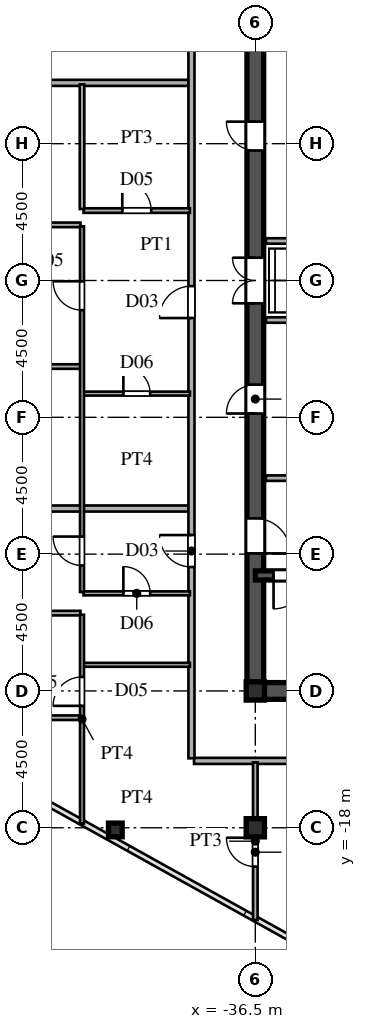
"""IFC4 building model, lengths in metres.
Left out: names, types, materials, properties, quantities, classifications, styles, units other than length and angle.
Written with IfcOpenShell. Run it as: python <this file> out.ifc"""

import sys

from ifc_helpers import new_model, si_unit, direction, frame, frame_2d, origin, origin_2d, place, context, subcontext, project, spatial, rectangle, hollow_rectangle, i_section, extrude, source, transform, mapped, element, fill, save


model = new_model("IFC4")
c1 = context("Model", 3, precision=1e-05, world=origin(), true_north=direction((0.0, 1.0)))
c2 = subcontext(c1, "Body", "Model", "MODEL_VIEW")
j1 = project(units=[si_unit("LENGTHUNIT", "METRE"), si_unit("PLANEANGLEUNIT", "RADIAN")], contexts=[c1])
p1 = place(None, origin())
s1 = spatial("IfcSite", under=j1, at=p1, CompositionType="ELEMENT")
p2 = place(p1, origin())
s2 = spatial("IfcBuilding", under=s1, at=p2, CompositionType="ELEMENT")
p3 = place(p2, frame((0.0, 0.0, 158.4)))
s3 = spatial("IfcBuildingStorey", under=s2, at=p3, CompositionType="ELEMENT", Elevation=158.4)
m1 = source(origin(), c2, "Body", "SweptSolid", [
    extrude(i_section(OverallWidth=0.6, OverallDepth=0.6, WebThickness=0.025, FlangeThickness=0.04, at=origin_2d()), origin(), (0.0, 0.0, 1.0), 3.6),
])
for number, where, z_axis, x_axis in (
    (1, (-36.5, -18.0, 0.0), (0.0, 0.0, 1.0), (1.0, 0.0, 0.0)),
    (2, (-36.5, -13.5, 0.0), (0.0, 0.0, 1.0), (1.0, 0.0, 0.0)),
):
    element("IfcColumn", number, at=place(p3, frame(where, z_axis=z_axis, x_axis=x_axis)), inside=s3, PredefinedType="COLUMN", context=c2, shape_type="MappedRepresentation", body=[
        mapped(m1, transform((0.0, 0.0, 0.0), scale=1.0)),
    ])
m2 = source(origin(), c2, "Body", "SweptSolid", [
    extrude(hollow_rectangle(XDim=0.45, YDim=0.45, WallThickness=0.018, at=origin_2d()), origin(), (0.0, 0.0, 1.0), 3.6),
])
p4 = place(p3, frame((-41.104, -18.071, 0.0), z_axis=(0.0, 0.0, 1.0), x_axis=(1.0, 0.0, 0.0)))
e3 = element("IfcColumn", 3, at=p4, inside=s3, PredefinedType="COLUMN", context=c2, shape_type="MappedRepresentation", body=[
    mapped(m2, transform((0.0, 0.0, 0.0), scale=1.0)),
])
p5 = place(p3, frame((-36.5, -13.5, 0.0), z_axis=(0.0, 0.0, 1.0), x_axis=(1.0, 0.0, 0.0)))
e4 = element("IfcWall", 4, at=p5, inside=s3, PredefinedType="SHEAR", context=c2, shape_type="SweptSolid", body=[
    extrude(rectangle(XDim=9.0, YDim=0.55, at=frame_2d((4.5, 0.0))), origin(), (0.0, 0.0, 1.0), 3.34),
])
p6 = place(p3, frame((-36.5, -13.65, 0.0), z_axis=(0.0, 0.0, 1.0), x_axis=(0.0, 1.0, 0.0)))
e5 = element("IfcWall", 5, at=p6, inside=s3, PredefinedType="SHEAR", context=c2, shape_type="SweptSolid", body=[
    extrude(rectangle(XDim=7.15, YDim=0.55, at=frame_2d((3.575, 0.0))), origin(), (0.0, 0.0, 1.0), 3.34),
])
p7 = place(p6, frame((4.675, 0.0, 0.0)))
e6 = element("IfcOpeningElement", 6, at=p7, cuts=e5, PredefinedType="OPENING", context=c2, shape_type="SweptSolid", body=[
    extrude(rectangle(XDim=1.15, YDim=2.2, at=frame_2d((0.575, 1.1))), frame((0.0, 0.285, 0.0), z_axis=(0.0, -1.0, 0.0), x_axis=(1.0, 0.0, 0.0)), (0.0, 0.0, 1.0), 0.57),
])
p8 = place(p3, frame((-36.5, -1.3, 0.0), z_axis=(0.0, 0.0, 1.0), x_axis=(0.0, 1.0, 0.0)))
e7 = element("IfcWall", 7, at=p8, inside=s3, PredefinedType="SHEAR", context=c2, shape_type="SweptSolid", body=[
    extrude(rectangle(XDim=2.6, YDim=0.55, at=frame_2d((1.3, 0.0))), origin(), (0.0, 0.0, 1.0), 3.34),
])
p9 = place(p8, frame((0.55, 0.0, 0.0)))
e8 = element("IfcOpeningElement", 8, at=p9, cuts=e7, PredefinedType="OPENING", context=c2, shape_type="SweptSolid", body=[
    extrude(rectangle(XDim=1.5, YDim=2.3, at=frame_2d((0.75, 1.15))), frame((0.0, 0.285, 0.0), z_axis=(0.0, -1.0, 0.0), x_axis=(1.0, 0.0, 0.0)), (0.0, 0.0, 1.0), 0.57),
])
p10 = place(p3, frame((-36.5, -6.5, 0.0), z_axis=(0.0, 0.0, 1.0), x_axis=(0.0, 1.0, 0.0)))
e9 = element("IfcWall", 9, at=p10, inside=s3, PredefinedType="SHEAR", context=c2, shape_type="SweptSolid", body=[
    extrude(rectangle(XDim=5.2, YDim=0.55, at=frame_2d((2.6, 0.0))), origin(), (0.0, 0.0, 1.0), 3.34),
])
p11 = place(p10, frame((2.125, 0.0, 0.0)))
e10 = element("IfcOpeningElement", 10, at=p11, cuts=e9, PredefinedType="OPENING", context=c2, shape_type="SweptSolid", body=[
    extrude(rectangle(XDim=0.95, YDim=2.15, at=frame_2d((0.475, 1.075))), frame((0.0, 0.285, 0.0), z_axis=(0.0, -1.0, 0.0), x_axis=(1.0, 0.0, 0.0)), (0.0, 0.0, 1.0), 0.57),
])
p12 = place(p3, frame((-36.5, 1.3, 0.0), z_axis=(0.0, 0.0, 1.0), x_axis=(0.0, 1.0, 0.0)))
e11 = element("IfcWall", 11, at=p12, inside=s3, PredefinedType="SHEAR", context=c2, shape_type="SweptSolid", body=[
    extrude(rectangle(XDim=6.9, YDim=0.55, at=frame_2d((3.45, 0.0))), origin(), (0.0, 0.0, 1.0), 3.34),
])
p13 = place(p12, frame((2.975, 0.0, 0.0)))
e12 = element("IfcOpeningElement", 12, at=p13, cuts=e11, PredefinedType="OPENING", context=c2, shape_type="SweptSolid", body=[
    extrude(rectangle(XDim=0.95, YDim=2.15, at=frame_2d((0.475, 1.075))), frame((0.0, 0.285, 0.0), z_axis=(0.0, -1.0, 0.0), x_axis=(1.0, 0.0, 0.0)), (0.0, 0.0, 1.0), 0.57),
])
p14 = place(p3, frame((-36.5, -9.7, 0.0), z_axis=(0.0, 0.0, 1.0), x_axis=(1.0, 0.0, 0.0)))
e13 = element("IfcWall", 13, at=p14, inside=s3, PredefinedType="SHEAR", context=c2, shape_type="SweptSolid", body=[
    extrude(rectangle(XDim=9.0, YDim=0.3, at=frame_2d((4.5, 0.0))), origin(), (0.0, 0.0, 1.0), 3.34),
])
p15 = place(p14, frame((0.6, 0.0, 0.0)))
e14 = element("IfcOpeningElement", 14, at=p15, cuts=e13, PredefinedType="OPENING", context=c2, shape_type="SweptSolid", body=[
    extrude(rectangle(XDim=1.1, YDim=2.2, at=frame_2d((0.55, 1.1))), frame((0.0, 0.16, 0.0), z_axis=(0.0, -1.0, 0.0), x_axis=(1.0, 0.0, 0.0)), (0.0, 0.0, 1.0), 0.32),
])
p16 = place(p3, frame((-36.15, -6.5, 0.0), z_axis=(0.0, 0.0, 1.0), x_axis=(1.0, 0.0, 0.0)))
e15 = element("IfcWall", 15, at=p16, inside=s3, PredefinedType="PARTITIONING", context=c2, shape_type="SweptSolid", body=[
    extrude(rectangle(XDim=5.7, YDim=0.18, at=frame_2d((2.85, 0.0))), origin(), (0.0, 0.0, 1.0), 3.34),
])
for number, where, z_axis, x_axis in (
    (16, (-36.15, -1.3, 0.0), (0.0, 0.0, 1.0), (1.0, 0.0, 0.0)),
    (17, (-36.15, 1.3, 0.0), (0.0, 0.0, 1.0), (1.0, 0.0, 0.0)),
):
    element("IfcWall", number, at=place(p3, frame(where, z_axis=z_axis, x_axis=x_axis)), inside=s3, PredefinedType="PARTITIONING", context=c2, shape_type="SweptSolid", body=[
        extrude(rectangle(XDim=2.95, YDim=0.18, at=frame_2d((1.475, 0.0))), origin(), (0.0, 0.0, 1.0), 3.34),
    ])
p17 = place(p3, frame((-38.515, -15.8, 0.0), z_axis=(0.0, 0.0, 1.0), x_axis=(1.0, 0.0, 0.0)))
e18 = element("IfcWall", 18, at=p17, inside=s3, PredefinedType="PARTITIONING", context=c2, shape_type="SweptSolid", body=[
    extrude(rectangle(XDim=11.015, YDim=0.2, at=frame_2d((5.507, 0.0))), origin(), (0.0, 0.0, 1.0), 3.34),
])
p18 = place(p3, frame((-48.425, -14.38, 0.0), z_axis=(0.0, 0.0, 1.0), x_axis=(1.0, 0.0, 0.0)))
e19 = element("IfcWall", 19, at=p18, inside=s3, PredefinedType="PARTITIONING", context=c2, shape_type="SweptSolid", body=[
    extrude(rectangle(XDim=6.175, YDim=0.15, at=frame_2d((3.087, 0.0))), origin(), (0.0, 0.0, 1.0), 3.34),
])
p19 = place(p18, frame((3.281, 0.0, 0.0)))
e20 = element("IfcOpeningElement", 20, at=p19, cuts=e19, PredefinedType="OPENING", context=c2, shape_type="SweptSolid", body=[
    extrude(rectangle(XDim=0.95, YDim=2.15, at=frame_2d((0.475, 1.075))), frame((0.0, 0.085, 0.0), z_axis=(0.0, -1.0, 0.0), x_axis=(1.0, 0.0, 0.0)), (0.0, 0.0, 1.0), 0.17),
])
p20 = place(p3, frame((-42.15, -12.64, 0.0), z_axis=(0.0, 0.0, 1.0), x_axis=(1.0, 0.0, 0.0)))
e21 = element("IfcWall", 21, at=p20, inside=s3, PredefinedType="PARTITIONING", context=c2, shape_type="SweptSolid", body=[
    extrude(rectangle(XDim=3.5, YDim=0.13, at=frame_2d((1.75, 0.0))), origin(), (0.0, 0.0, 1.0), 3.34),
])
p21 = place(p3, frame((-54.45, -10.94, 0.0), z_axis=(0.0, 0.0, 1.0), x_axis=(1.0, 0.0, 0.0)))
e22 = element("IfcWall", 22, at=p21, inside=s3, PredefinedType="PARTITIONING", context=c2, shape_type="SweptSolid", body=[
    extrude(rectangle(XDim=12.2, YDim=0.15, at=frame_2d((6.1, 0.0))), origin(), (0.0, 0.0, 1.0), 3.34),
])
p22 = place(p21, frame((5.625, 0.0, 0.0)))
e23 = element("IfcOpeningElement", 23, at=p22, cuts=e22, PredefinedType="OPENING", context=c2, shape_type="SweptSolid", body=[
    extrude(rectangle(XDim=0.95, YDim=2.15, at=frame_2d((0.475, 1.075))), frame((0.0, 0.085, 0.0), z_axis=(0.0, -1.0, 0.0), x_axis=(1.0, 0.0, 0.0)), (0.0, 0.0, 1.0), 0.17),
])
p23 = place(p3, frame((-42.15, -10.29, 0.0), z_axis=(0.0, 0.0, 1.0), x_axis=(1.0, 0.0, 0.0)))
e24 = element("IfcWall", 24, at=p23, inside=s3, PredefinedType="PARTITIONING", context=c2, shape_type="SweptSolid", body=[
    extrude(rectangle(XDim=3.5, YDim=0.13, at=frame_2d((1.75, 0.0))), origin(), (0.0, 0.0, 1.0), 3.34),
])
p24 = place(p23, frame((1.31, 0.0, 0.0)))
e25 = element("IfcOpeningElement", 25, at=p24, cuts=e24, PredefinedType="OPENING", context=c2, shape_type="SweptSolid", body=[
    extrude(rectangle(XDim=0.88, YDim=2.1, at=frame_2d((0.44, 1.05))), frame((0.0, 0.075, 0.0), z_axis=(0.0, -1.0, 0.0), x_axis=(1.0, 0.0, 0.0)), (0.0, 0.0, 1.0), 0.15),
])
p25 = place(p3, frame((-60.779, -7.5, 0.0), z_axis=(0.0, 0.0, 1.0), x_axis=(1.0, 0.0, 0.0)))
e26 = element("IfcWall", 26, at=p25, inside=s3, PredefinedType="PARTITIONING", context=c2, shape_type="SweptSolid", body=[
    extrude(rectangle(XDim=22.099, YDim=0.2, at=frame_2d((11.05, 0.0))), origin(), (0.0, 0.0, 1.0), 3.34),
])
p26 = place(p3, frame((-42.15, -3.72, 0.0), z_axis=(0.0, 0.0, 1.0), x_axis=(1.0, 0.0, 0.0)))
e27 = element("IfcWall", 27, at=p26, inside=s3, PredefinedType="PARTITIONING", context=c2, shape_type="SweptSolid", body=[
    extrude(rectangle(XDim=3.5, YDim=0.13, at=frame_2d((1.75, 0.0))), origin(), (0.0, 0.0, 1.0), 3.34),
])
p27 = place(p26, frame((1.31, 0.0, 0.0)))
e28 = element("IfcOpeningElement", 28, at=p27, cuts=e27, PredefinedType="OPENING", context=c2, shape_type="SweptSolid", body=[
    extrude(rectangle(XDim=0.88, YDim=2.1, at=frame_2d((0.44, 1.05))), frame((0.0, 0.075, 0.0), z_axis=(0.0, -1.0, 0.0), x_axis=(1.0, 0.0, 0.0)), (0.0, 0.0, 1.0), 0.15),
])
p28 = place(p3, frame((-68.375, -2.83, 0.0), z_axis=(0.0, 0.0, 1.0), x_axis=(1.0, 0.0, 0.0)))
e29 = element("IfcWall", 29, at=p28, inside=s3, PredefinedType="PARTITIONING", context=c2, shape_type="SweptSolid", body=[
    extrude(rectangle(XDim=26.125, YDim=0.15, at=frame_2d((13.062, 0.0))), origin(), (0.0, 0.0, 1.0), 3.34),
])
p29 = place(p28, frame((22.625, 0.0, 0.0)))
e30 = element("IfcOpeningElement", 30, at=p29, cuts=e29, PredefinedType="OPENING", context=c2, shape_type="SweptSolid", body=[
    extrude(rectangle(XDim=0.95, YDim=2.15, at=frame_2d((0.475, 1.075))), frame((0.0, 0.085, 0.0), z_axis=(0.0, -1.0, 0.0), x_axis=(1.0, 0.0, 0.0)), (0.0, 0.0, 1.0), 0.17),
])
p30 = place(p28, frame((10.55, 0.0, 0.0)))
e31 = element("IfcOpeningElement", 31, at=p30, cuts=e29, PredefinedType="OPENING", context=c2, shape_type="SweptSolid", body=[
    extrude(rectangle(XDim=0.95, YDim=2.15, at=frame_2d((0.475, 1.075))), frame((0.0, 0.085, 0.0), z_axis=(0.0, -1.0, 0.0), x_axis=(1.0, 0.0, 0.0)), (0.0, 0.0, 1.0), 0.17),
])
p31 = place(p3, frame((-68.535, 1.83, 0.0), z_axis=(0.0, 0.0, 1.0), x_axis=(1.0, 0.0, 0.0)))
e32 = element("IfcWall", 32, at=p31, inside=s3, PredefinedType="PARTITIONING", context=c2, shape_type="SweptSolid", body=[
    extrude(rectangle(XDim=26.285, YDim=0.15, at=frame_2d((13.143, 0.0))), origin(), (0.0, 0.0, 1.0), 3.34),
])
p32 = place(p31, frame((22.785, 0.0, 0.0)))
e33 = element("IfcOpeningElement", 33, at=p32, cuts=e32, PredefinedType="OPENING", context=c2, shape_type="SweptSolid", body=[
    extrude(rectangle(XDim=0.95, YDim=2.15, at=frame_2d((0.475, 1.075))), frame((0.0, 0.085, 0.0), z_axis=(0.0, -1.0, 0.0), x_axis=(1.0, 0.0, 0.0)), (0.0, 0.0, 1.0), 0.17),
])
p33 = place(p31, frame((10.71, 0.0, 0.0)))
e34 = element("IfcOpeningElement", 34, at=p33, cuts=e32, PredefinedType="OPENING", context=c2, shape_type="SweptSolid", body=[
    extrude(rectangle(XDim=0.95, YDim=2.15, at=frame_2d((0.475, 1.075))), frame((0.0, 0.085, 0.0), z_axis=(0.0, -1.0, 0.0), x_axis=(1.0, 0.0, 0.0)), (0.0, 0.0, 1.0), 0.17),
])
p34 = place(p31, frame((16.635, 0.0, 0.0)))
e35 = element("IfcOpeningElement", 35, at=p34, cuts=e32, PredefinedType="OPENING", context=c2, shape_type="SweptSolid", body=[
    extrude(rectangle(XDim=0.95, YDim=2.15, at=frame_2d((0.475, 1.075))), frame((0.0, 0.085, 0.0), z_axis=(0.0, -1.0, 0.0), x_axis=(1.0, 0.0, 0.0)), (0.0, 0.0, 1.0), 0.17),
])
p35 = place(p3, frame((-42.15, 2.3, 0.0), z_axis=(0.0, 0.0, 1.0), x_axis=(1.0, 0.0, 0.0)))
e36 = element("IfcWall", 36, at=p35, inside=s3, PredefinedType="PARTITIONING", context=c2, shape_type="SweptSolid", body=[
    extrude(rectangle(XDim=3.5, YDim=0.15, at=frame_2d((1.75, 0.0))), origin(), (0.0, 0.0, 1.0), 3.34),
])
p36 = place(p35, frame((1.275, 0.0, 0.0)))
e37 = element("IfcOpeningElement", 37, at=p36, cuts=e36, PredefinedType="OPENING", context=c2, shape_type="SweptSolid", body=[
    extrude(rectangle(XDim=0.95, YDim=2.15, at=frame_2d((0.475, 1.075))), frame((0.0, 0.085, 0.0), z_axis=(0.0, -1.0, 0.0), x_axis=(1.0, 0.0, 0.0)), (0.0, 0.0, 1.0), 0.17),
])
p37 = place(p3, frame((-62.577, 6.5, 0.0), z_axis=(0.0, 0.0, 1.0), x_axis=(1.0, 0.0, 0.0)))
e38 = element("IfcWall", 38, at=p37, inside=s3, PredefinedType="PARTITIONING", context=c2, shape_type="SweptSolid", body=[
    extrude(rectangle(XDim=23.897, YDim=0.2, at=frame_2d((11.948, 0.0))), origin(), (0.0, 0.0, 1.0), 3.34),
])
p38 = place(p3, frame((-42.2, -17.862, 0.0), z_axis=(0.0, 0.0, 1.0), x_axis=(0.0, 1.0, 0.0)))
e39 = element("IfcWall", 39, at=p38, inside=s3, PredefinedType="PARTITIONING", context=c2, shape_type="SweptSolid", body=[
    extrude(rectangle(XDim=6.87, YDim=0.13, at=frame_2d((3.435, 0.0))), origin(), (0.0, 0.0, 1.0), 3.34),
])
p39 = place(p38, frame((3.872, 0.0, 0.0)))
e40 = element("IfcOpeningElement", 40, at=p39, cuts=e39, PredefinedType="OPENING", context=c2, shape_type="SweptSolid", body=[
    extrude(rectangle(XDim=0.95, YDim=2.15, at=frame_2d((0.475, 1.075))), frame((0.0, 0.075, 0.0), z_axis=(0.0, -1.0, 0.0), x_axis=(1.0, 0.0, 0.0)), (0.0, 0.0, 1.0), 0.15),
])
p40 = place(p3, frame((-42.2, -10.245, 0.0), z_axis=(0.0, 0.0, 1.0), x_axis=(0.0, 1.0, 0.0)))
e41 = element("IfcWall", 41, at=p40, inside=s3, PredefinedType="PARTITIONING", context=c2, shape_type="SweptSolid", body=[
    extrude(rectangle(XDim=12.028, YDim=0.13, at=frame_2d((6.014, 0.0))), origin(), (0.0, 0.0, 1.0), 3.34),
])
p41 = place(p40, frame((0.873, 0.0, 0.0)))
e42 = element("IfcOpeningElement", 42, at=p41, cuts=e41, PredefinedType="OPENING", context=c2, shape_type="SweptSolid", body=[
    extrude(rectangle(XDim=0.95, YDim=2.15, at=frame_2d((0.475, 1.075))), frame((0.0, 0.075, 0.0), z_axis=(0.0, -1.0, 0.0), x_axis=(1.0, 0.0, 0.0)), (0.0, 0.0, 1.0), 0.15),
])
p42 = place(p40, frame((9.27, 0.0, 0.0)))
e43 = element("IfcOpeningElement", 43, at=p42, cuts=e41, PredefinedType="OPENING", context=c2, shape_type="SweptSolid", body=[
    extrude(rectangle(XDim=0.95, YDim=2.15, at=frame_2d((0.475, 1.075))), frame((0.0, 0.075, 0.0), z_axis=(0.0, -1.0, 0.0), x_axis=(1.0, 0.0, 0.0)), (0.0, 0.0, 1.0), 0.15),
])
p43 = place(p3, frame((-42.2, 2.352, 0.0), z_axis=(0.0, 0.0, 1.0), x_axis=(0.0, 1.0, 0.0)))
e44 = element("IfcWall", 44, at=p43, inside=s3, PredefinedType="PARTITIONING", context=c2, shape_type="SweptSolid", body=[
    extrude(rectangle(XDim=4.098, YDim=0.15, at=frame_2d((2.049, 0.0))), origin(), (0.0, 0.0, 1.0), 3.34),
])
p44 = place(p3, frame((-38.6, -15.715, 0.0), z_axis=(0.0, 0.0, 1.0), x_axis=(0.0, 1.0, 0.0)))
e45 = element("IfcWall", 45, at=p44, inside=s3, PredefinedType="PARTITIONING", context=c2, shape_type="SweptSolid", body=[
    extrude(rectangle(XDim=31.43, YDim=0.2, at=frame_2d((15.715, 0.0))), origin(), (0.0, 0.0, 1.0), 3.34),
])
p45 = place(p44, frame((6.292, 0.0, 0.0)))
e46 = element("IfcOpeningElement", 46, at=p45, cuts=e45, PredefinedType="OPENING", context=c2, shape_type="SweptSolid", body=[
    extrude(rectangle(XDim=1.05, YDim=2.25, at=frame_2d((0.525, 1.125))), frame((0.0, 0.11, 0.0), z_axis=(0.0, -1.0, 0.0), x_axis=(1.0, 0.0, 0.0)), (0.0, 0.0, 1.0), 0.22),
])
p46 = place(p44, frame((14.48, 0.0, 0.0)))
e47 = element("IfcOpeningElement", 47, at=p46, cuts=e45, PredefinedType="OPENING", context=c2, shape_type="SweptSolid", body=[
    extrude(rectangle(XDim=1.05, YDim=2.25, at=frame_2d((0.525, 1.125))), frame((0.0, 0.11, 0.0), z_axis=(0.0, -1.0, 0.0), x_axis=(1.0, 0.0, 0.0)), (0.0, 0.0, 1.0), 0.22),
])
p47 = place(p44, frame((26.34, 0.0, 0.0)))
e48 = element("IfcOpeningElement", 48, at=p47, cuts=e45, PredefinedType="OPENING", context=c2, shape_type="SweptSolid", body=[
    extrude(rectangle(XDim=1.05, YDim=2.25, at=frame_2d((0.525, 1.125))), frame((0.0, 0.11, 0.0), z_axis=(0.0, -1.0, 0.0), x_axis=(1.0, 0.0, 0.0)), (0.0, 0.0, 1.0), 0.22),
])
p48 = place(p3, frame((-36.5, -21.032, 0.0), z_axis=(0.0, 0.0, 1.0), x_axis=(0.0, 1.0, 0.0)))
e49 = element("IfcWall", 49, at=p48, inside=s3, PredefinedType="PARTITIONING", context=c2, shape_type="SweptSolid", body=[
    extrude(rectangle(XDim=3.012, YDim=0.15, at=frame_2d((1.506, 0.0))), origin(), (0.0, 0.0, 1.0), 3.34),
])
p49 = place(p48, frame((1.754, 0.0, 0.0)))
e50 = element("IfcOpeningElement", 50, at=p49, cuts=e49, PredefinedType="OPENING", context=c2, shape_type="SweptSolid", body=[
    extrude(rectangle(XDim=0.95, YDim=2.15, at=frame_2d((0.475, 1.075))), frame((0.0, 0.085, 0.0), z_axis=(0.0, -1.0, 0.0), x_axis=(1.0, 0.0, 0.0)), (0.0, 0.0, 1.0), 0.17),
])
p50 = place(p3, frame((-36.5, -18.02, 0.0), z_axis=(0.0, 0.0, 1.0), x_axis=(0.0, 1.0, 0.0)))
e51 = element("IfcWall", 51, at=p50, inside=s3, PredefinedType="PARTITIONING", context=c2, shape_type="SweptSolid", body=[
    extrude(rectangle(XDim=2.17, YDim=0.15, at=frame_2d((1.085, 0.0))), origin(), (0.0, 0.0, 1.0), 2.44),
])
m3 = source(origin(), c2, "Body", "SweptSolid", [
    extrude(rectangle(XDim=1.15, YDim=2.2, at=frame_2d((0.575, 1.1))), frame((0.0, 0.025, 0.0), z_axis=(0.0, -1.0, 0.0), x_axis=(1.0, 0.0, 0.0)), (0.0, 0.0, 1.0), 0.05),
])
p51 = place(p7, frame((1.15, 0.0, 0.0), z_axis=(0.0, 0.0, 1.0), x_axis=(-1.0, 0.0, 0.0)))
e52 = element("IfcDoor", 52, at=p51, inside=s3, OperationType="SINGLE_SWING_LEFT", PredefinedType="DOOR", context=c2, shape_type="MappedRepresentation", body=[
    mapped(m3, transform((0.0, 0.0, 0.0), scale=1.0)),
])
fill(e6, e52)
m4 = source(origin(), c2, "Body", "SweptSolid", [
    extrude(rectangle(XDim=1.5, YDim=2.3, at=frame_2d((0.75, 1.15))), frame((0.0, 0.025, 0.0), z_axis=(0.0, -1.0, 0.0), x_axis=(1.0, 0.0, 0.0)), (0.0, 0.0, 1.0), 0.05),
])
p52 = place(p9, origin())
e53 = element("IfcDoor", 53, at=p52, inside=s3, OperationType="DOUBLE_SWING_LEFT", PredefinedType="DOOR", context=c2, shape_type="MappedRepresentation", body=[
    mapped(m4, transform((0.0, 0.0, 0.0), scale=1.0)),
])
fill(e8, e53)
m5 = source(origin(), c2, "Body", "SweptSolid", [
    extrude(rectangle(XDim=0.95, YDim=2.15, at=frame_2d((0.475, 1.075))), frame((0.0, 0.025, 0.0), z_axis=(0.0, -1.0, 0.0), x_axis=(1.0, 0.0, 0.0)), (0.0, 0.0, 1.0), 0.05),
])
p53 = place(p11, origin())
e54 = element("IfcDoor", 54, at=p53, inside=s3, OperationType="SINGLE_SWING_LEFT", PredefinedType="DOOR", context=c2, shape_type="MappedRepresentation", body=[
    mapped(m5, transform((0.0, 0.0, 0.0), scale=1.0)),
])
fill(e10, e54)
p54 = place(p13, origin())
e55 = element("IfcDoor", 55, at=p54, inside=s3, OperationType="SINGLE_SWING_RIGHT", PredefinedType="DOOR", context=c2, shape_type="MappedRepresentation", body=[
    mapped(m5, transform((0.0, 0.0, 0.0), scale=1.0)),
])
fill(e12, e55)
m6 = source(origin(), c2, "Body", "SweptSolid", [
    extrude(rectangle(XDim=1.1, YDim=2.2, at=frame_2d((0.55, 1.1))), frame((0.0, 0.025, 0.0), z_axis=(0.0, -1.0, 0.0), x_axis=(1.0, 0.0, 0.0)), (0.0, 0.0, 1.0), 0.05),
])
p55 = place(p15, frame((1.1, 0.0, 0.0), z_axis=(0.0, 0.0, 1.0), x_axis=(-1.0, 0.0, 0.0)))
e56 = element("IfcDoor", 56, at=p55, inside=s3, OperationType="SINGLE_SWING_LEFT", PredefinedType="DOOR", context=c2, shape_type="MappedRepresentation", body=[
    mapped(m6, transform((0.0, 0.0, 0.0), scale=1.0)),
])
fill(e14, e56)
m7 = source(origin(), c2, "Body", "SweptSolid", [
    extrude(rectangle(XDim=0.88, YDim=2.1, at=frame_2d((0.44, 1.05))), frame((0.0, 0.025, 0.0), z_axis=(0.0, -1.0, 0.0), x_axis=(1.0, 0.0, 0.0)), (0.0, 0.0, 1.0), 0.05),
])
p56 = place(p24, origin())
e57 = element("IfcDoor", 57, at=p56, inside=s3, OperationType="SINGLE_SWING_LEFT", PredefinedType="DOOR", context=c2, shape_type="MappedRepresentation", body=[
    mapped(m7, transform((0.0, 0.0, 0.0), scale=1.0)),
])
fill(e25, e57)
p57 = place(p27, origin())
e58 = element("IfcDoor", 58, at=p57, inside=s3, OperationType="SINGLE_SWING_LEFT", PredefinedType="DOOR", context=c2, shape_type="MappedRepresentation", body=[
    mapped(m7, transform((0.0, 0.0, 0.0), scale=1.0)),
])
fill(e28, e58)
m8 = source(origin(), c2, "Body", "SweptSolid", [
    extrude(rectangle(XDim=0.95, YDim=2.15, at=frame_2d((0.475, 1.075))), frame((0.0, 0.025, 0.0), z_axis=(0.0, -1.0, 0.0), x_axis=(1.0, 0.0, 0.0)), (0.0, 0.0, 1.0), 0.05),
])
p58 = place(p36, origin())
e59 = element("IfcDoor", 59, at=p58, inside=s3, OperationType="SINGLE_SWING_LEFT", PredefinedType="DOOR", context=c2, shape_type="MappedRepresentation", body=[
    mapped(m8, transform((0.0, 0.0, 0.0), scale=1.0)),
])
fill(e37, e59)
p59 = place(p39, origin())
e60 = element("IfcDoor", 60, at=p59, inside=s3, OperationType="SINGLE_SWING_LEFT", PredefinedType="DOOR", context=c2, shape_type="MappedRepresentation", body=[
    mapped(m8, transform((0.0, 0.0, 0.0), scale=1.0)),
])
fill(e40, e60)
p60 = place(p41, origin())
e61 = element("IfcDoor", 61, at=p60, inside=s3, OperationType="SINGLE_SWING_RIGHT", PredefinedType="DOOR", context=c2, shape_type="MappedRepresentation", body=[
    mapped(m8, transform((0.0, 0.0, 0.0), scale=1.0)),
])
fill(e42, e61)
p61 = place(p42, origin())
e62 = element("IfcDoor", 62, at=p61, inside=s3, OperationType="SINGLE_SWING_RIGHT", PredefinedType="DOOR", context=c2, shape_type="MappedRepresentation", body=[
    mapped(m8, transform((0.0, 0.0, 0.0), scale=1.0)),
])
fill(e43, e62)
m9 = source(origin(), c2, "Body", "SweptSolid", [
    extrude(rectangle(XDim=1.05, YDim=2.25, at=frame_2d((0.525, 1.125))), frame((0.0, 0.025, 0.0), z_axis=(0.0, -1.0, 0.0), x_axis=(1.0, 0.0, 0.0)), (0.0, 0.0, 1.0), 0.05),
])
p62 = place(p45, origin())
e63 = element("IfcDoor", 63, at=p62, inside=s3, OperationType="SINGLE_SWING_RIGHT", PredefinedType="DOOR", context=c2, shape_type="MappedRepresentation", body=[
    mapped(m9, transform((0.0, 0.0, 0.0), scale=1.0)),
])
fill(e46, e63)
p63 = place(p46, origin())
e64 = element("IfcDoor", 64, at=p63, inside=s3, OperationType="SINGLE_SWING_LEFT", PredefinedType="DOOR", context=c2, shape_type="MappedRepresentation", body=[
    mapped(m9, transform((0.0, 0.0, 0.0), scale=1.0)),
])
fill(e47, e64)
p64 = place(p49, origin())
e65 = element("IfcDoor", 65, at=p64, inside=s3, OperationType="SINGLE_SWING_RIGHT", PredefinedType="DOOR", context=c2, shape_type="MappedRepresentation", body=[
    mapped(m8, transform((0.0, 0.0, 0.0), scale=1.0)),
])
fill(e50, e65)
save(model, sys.argv[1])
